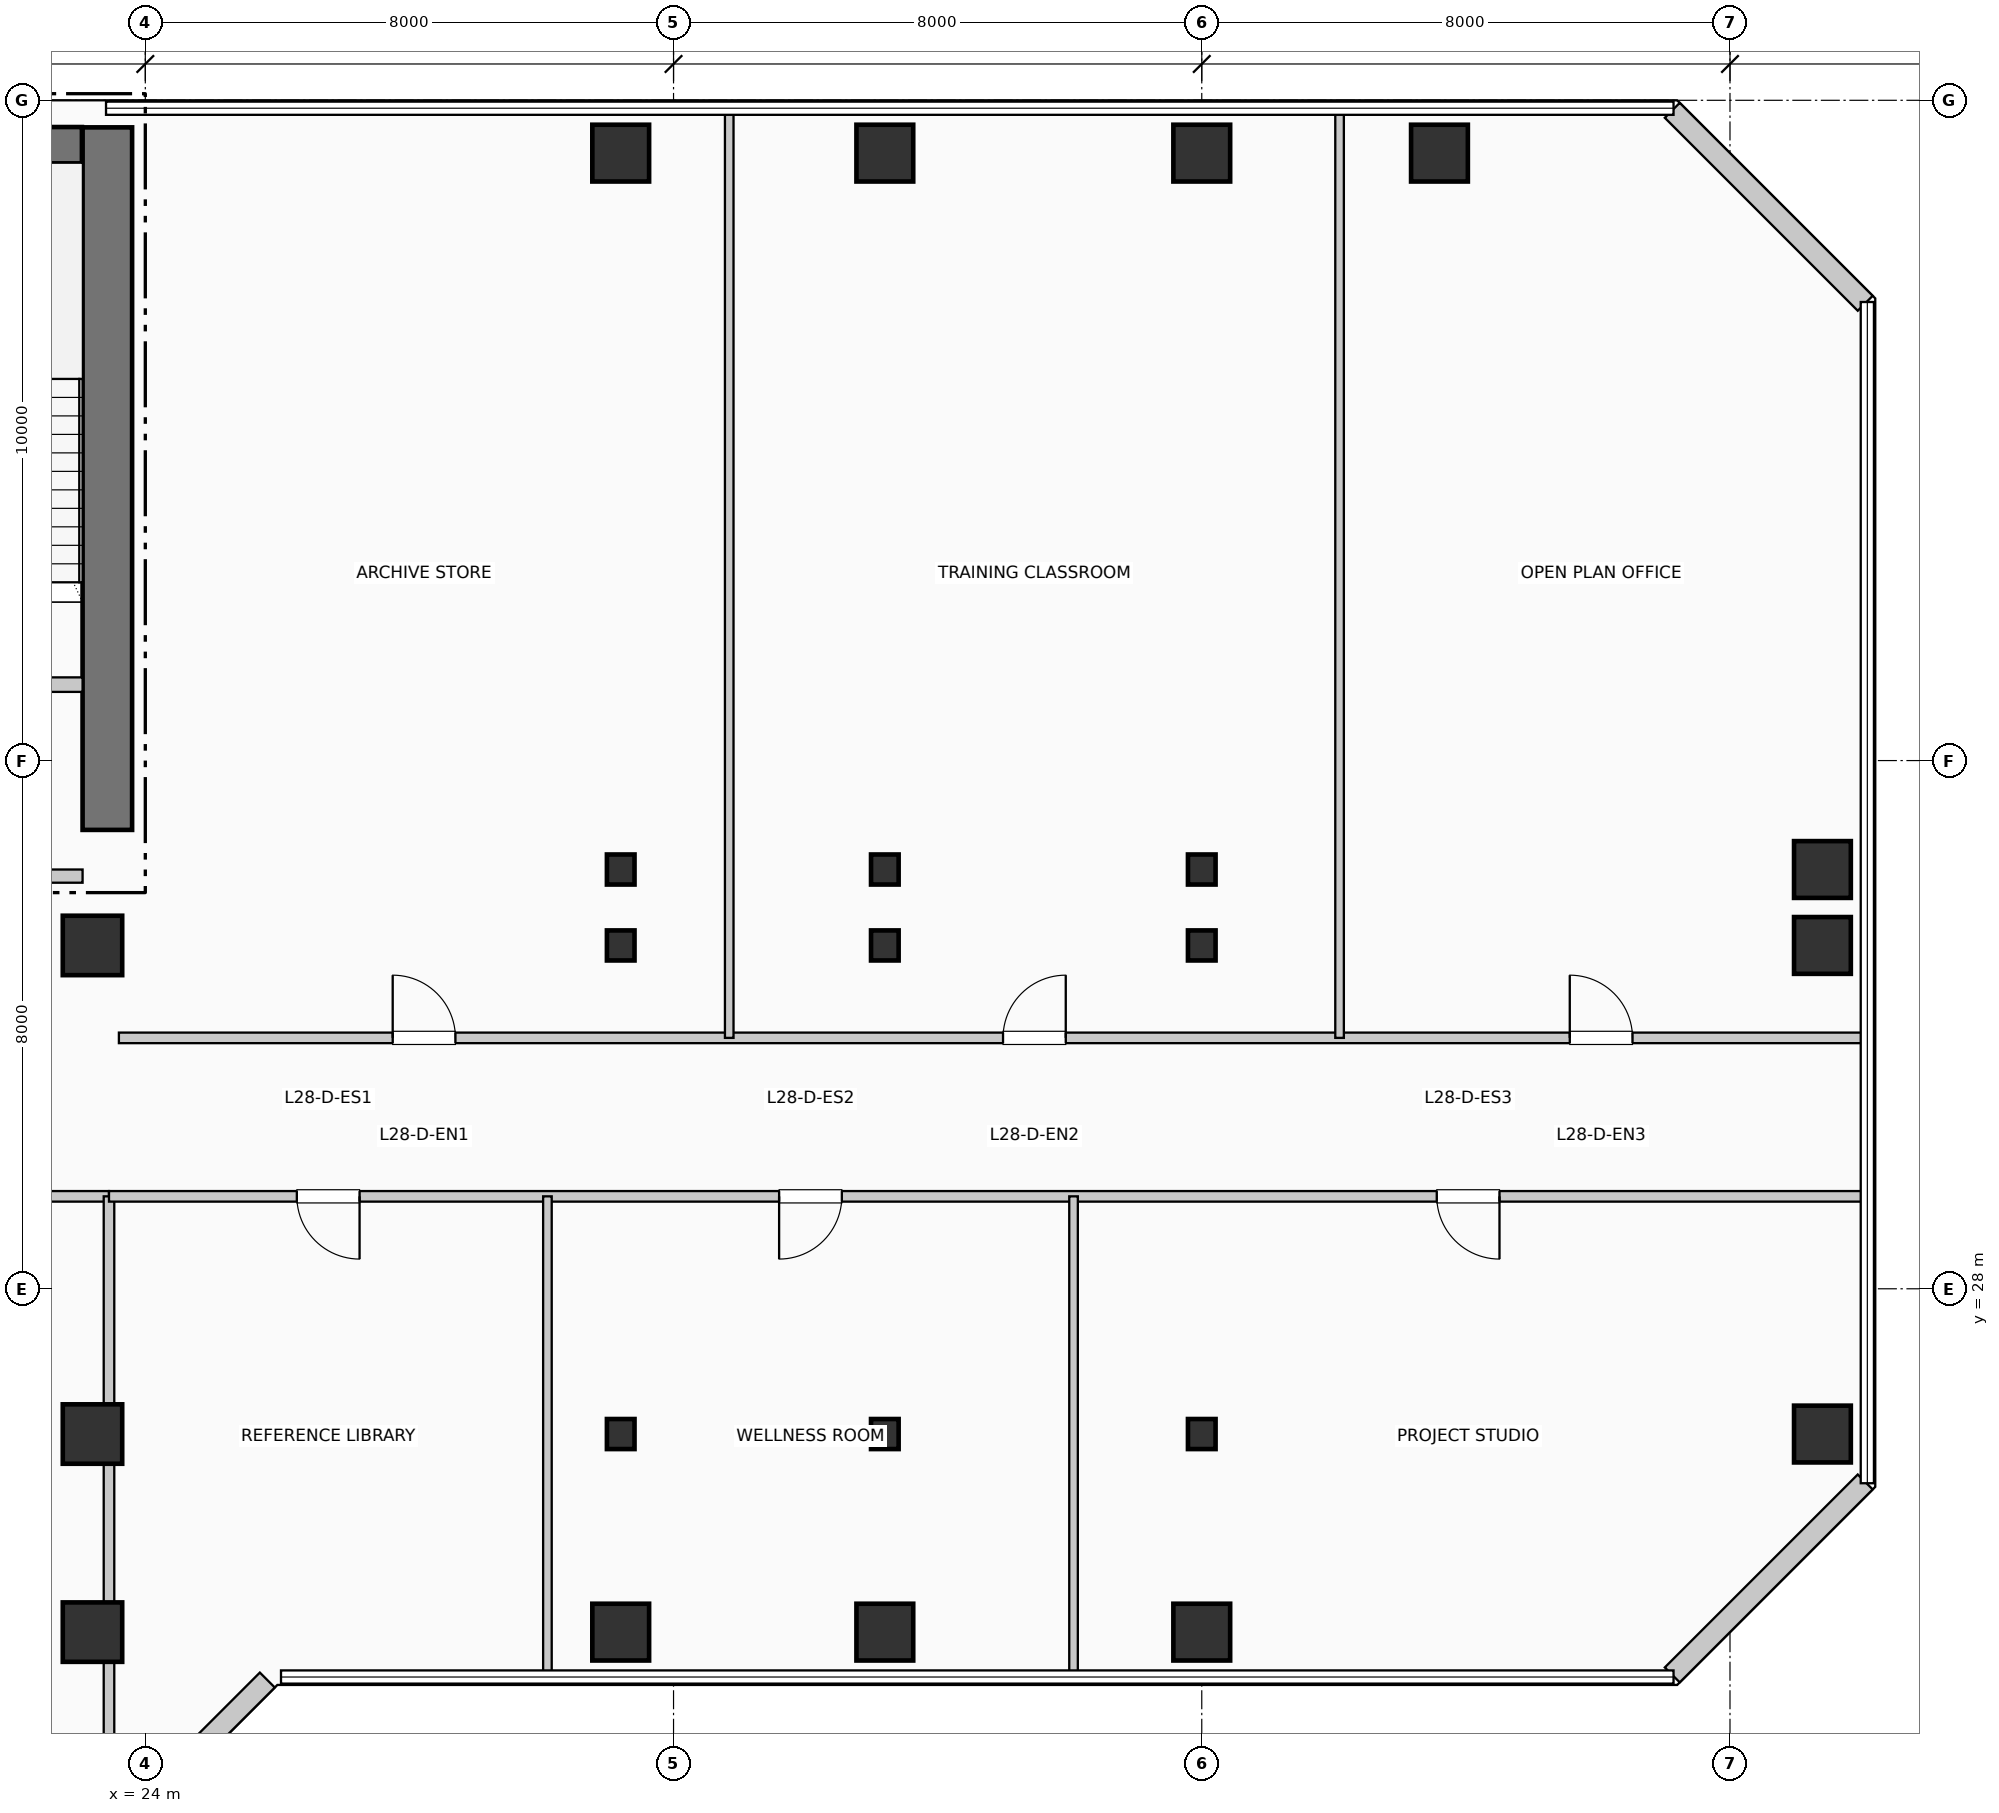
"""IFC4 building model, lengths in metres.
Left out: names, types, materials, properties, quantities, classifications, styles, units other than length and angle.
Written with IfcOpenShell. Run it as: python <this file> out.ifc"""

import sys

from ifc_helpers import new_model, si_unit, direction, frame, frame_2d, origin, origin_2d, place, context, subcontext, project, spatial, rectangle, i_section, extrude, element, fill, save


model = new_model("IFC4")
c1 = context("Model", 3, precision=1e-05, world=origin(), true_north=direction((0.0, 1.0)))
c2 = subcontext(c1, "Body", "Model", "MODEL_VIEW")
j1 = project(units=[si_unit("LENGTHUNIT", "METRE"), si_unit("PLANEANGLEUNIT", "RADIAN")], contexts=[c1])
p1 = place(None, origin())
s1 = spatial("IfcSite", under=j1, at=p1, CompositionType="ELEMENT")
p2 = place(p1, origin())
s2 = spatial("IfcBuilding", under=s1, at=p2, CompositionType="ELEMENT")
p3 = place(p2, frame((0.0, 0.0, 118.47)))
s3 = spatial("IfcBuildingStorey", under=s2, at=p3, CompositionType="ELEMENT", Elevation=118.47)
p4 = place(p3, frame((23.425, 34.95, 0.0), z_axis=(0.0, 0.0, 1.0), x_axis=(0.0, 1.0, 0.0)))
e1 = element("IfcWall", 1, at=p4, inside=s3, PredefinedType="SHEAR", context=c2, shape_type="SweptSolid", body=[
    extrude(rectangle(XDim=10.64, YDim=0.75, at=frame_2d((5.32, 0.0))), origin(), (0.0, 0.0, 1.0), 3.96),
])
p5 = place(p3, frame((19.35, 45.32, 0.0), z_axis=(0.0, 0.0, 1.0), x_axis=(1.0, 0.0, 0.0)))
e2 = element("IfcWall", 2, at=p5, inside=s3, PredefinedType="SHEAR", context=c2, shape_type="SweptSolid", body=[
    extrude(rectangle(XDim=3.69, YDim=0.55, at=frame_2d((1.845, 0.0))), origin(), (0.0, 0.0, 1.0), 3.96),
])
p6 = place(p5, frame((1.15, 0.0, 1.05)))
e3 = element("IfcOpeningElement", 3, at=p6, cuts=e2, PredefinedType="OPENING", context=c2, shape_type="SweptSolid", body=[
    extrude(rectangle(XDim=1.4, YDim=1.8, at=frame_2d((0.7, 0.9))), frame((0.0, 0.285, 0.0), z_axis=(0.0, -1.0, 0.0), x_axis=(1.0, 0.0, 0.0)), (0.0, 0.0, 1.0), 0.57),
])
for number, where, z_axis, x_axis in (
    (4, (23.2, 22.8, 0.0), (0.0, 0.0, 1.0), (1.0, 0.0, 0.0)),
    (5, (23.2, 25.8, 0.0), (0.0, 0.0, 1.0), (1.0, 0.0, 0.0)),
    (6, (23.2, 33.2, 0.0), (0.0, 0.0, 1.0), (1.0, 0.0, 0.0)),
):
    element("IfcColumn", number, at=place(p3, frame(where, z_axis=z_axis, x_axis=x_axis)), inside=s3, PredefinedType="COLUMN", context=c2, shape_type="SweptSolid", body=[
        extrude(rectangle(XDim=0.9, YDim=0.9, at=origin_2d()), origin(), (0.0, 0.0, 1.0), 3.96),
    ])
p7 = place(p3, frame((31.2, 22.8, 0.0), z_axis=(0.0, 0.0, 1.0), x_axis=(1.0, 0.0, 0.0)))
e7 = element("IfcColumn", 7, at=p7, inside=s3, PredefinedType="COLUMN", context=c2, shape_type="SweptSolid", body=[
    extrude(rectangle(XDim=0.86, YDim=0.86, at=origin_2d()), origin(), (0.0, 0.0, 1.0), 3.96),
])
for number, where, z_axis, x_axis in (
    (8, (31.2, 25.8, 0.0), (0.0, 0.0, 1.0), (1.0, 0.0, 0.0)),
    (9, (31.2, 33.2, 0.0), (0.0, 0.0, 1.0), (1.0, 0.0, 0.0)),
    (10, (31.2, 34.35, 0.0), (0.0, 0.0, 1.0), (1.0, 0.0, 0.0)),
):
    element("IfcColumn", number, at=place(p3, frame(where, z_axis=z_axis, x_axis=x_axis)), inside=s3, PredefinedType="COLUMN", context=c2, shape_type="SweptSolid", body=[
        extrude(i_section(OverallWidth=0.418, OverallDepth=0.455, WebThickness=0.032, FlangeThickness=0.051, at=origin_2d()), origin(), (0.0, 0.0, 1.0), 3.96),
    ])
for number, where, z_axis, x_axis in (
    (11, (31.2, 45.2, 0.0), (0.0, 0.0, 1.0), (1.0, 0.0, 0.0)),
    (12, (35.2, 22.8, 0.0), (0.0, 0.0, 1.0), (1.0, 0.0, 0.0)),
):
    element("IfcColumn", number, at=place(p3, frame(where, z_axis=z_axis, x_axis=x_axis)), inside=s3, PredefinedType="COLUMN", context=c2, shape_type="SweptSolid", body=[
        extrude(rectangle(XDim=0.86, YDim=0.86, at=origin_2d()), origin(), (0.0, 0.0, 1.0), 3.96),
    ])
for number, where, z_axis, x_axis in (
    (13, (35.2, 25.8, 0.0), (0.0, 0.0, 1.0), (1.0, 0.0, 0.0)),
    (14, (35.2, 33.2, 0.0), (0.0, 0.0, 1.0), (1.0, 0.0, 0.0)),
    (15, (35.2, 34.35, 0.0), (0.0, 0.0, 1.0), (1.0, 0.0, 0.0)),
):
    element("IfcColumn", number, at=place(p3, frame(where, z_axis=z_axis, x_axis=x_axis)), inside=s3, PredefinedType="COLUMN", context=c2, shape_type="SweptSolid", body=[
        extrude(i_section(OverallWidth=0.418, OverallDepth=0.455, WebThickness=0.032, FlangeThickness=0.051, at=origin_2d()), origin(), (0.0, 0.0, 1.0), 3.96),
    ])
for number, where, z_axis, x_axis in (
    (16, (35.2, 45.2, 0.0), (0.0, 0.0, 1.0), (1.0, 0.0, 0.0)),
    (17, (40.0, 22.8, 0.0), (0.0, 0.0, 1.0), (1.0, 0.0, 0.0)),
):
    element("IfcColumn", number, at=place(p3, frame(where, z_axis=z_axis, x_axis=x_axis)), inside=s3, PredefinedType="COLUMN", context=c2, shape_type="SweptSolid", body=[
        extrude(rectangle(XDim=0.86, YDim=0.86, at=origin_2d()), origin(), (0.0, 0.0, 1.0), 3.96),
    ])
for number, where, z_axis, x_axis in (
    (18, (40.0, 25.8, 0.0), (0.0, 0.0, 1.0), (1.0, 0.0, 0.0)),
    (19, (40.0, 33.2, 0.0), (0.0, 0.0, 1.0), (1.0, 0.0, 0.0)),
    (20, (40.0, 34.35, 0.0), (0.0, 0.0, 1.0), (1.0, 0.0, 0.0)),
):
    element("IfcColumn", number, at=place(p3, frame(where, z_axis=z_axis, x_axis=x_axis)), inside=s3, PredefinedType="COLUMN", context=c2, shape_type="SweptSolid", body=[
        extrude(i_section(OverallWidth=0.418, OverallDepth=0.455, WebThickness=0.032, FlangeThickness=0.051, at=origin_2d()), origin(), (0.0, 0.0, 1.0), 3.96),
    ])
for number, where, z_axis, x_axis in (
    (21, (40.0, 45.2, 0.0), (0.0, 0.0, 1.0), (1.0, 0.0, 0.0)),
    (22, (43.6, 45.2, 0.0), (0.0, 0.0, 1.0), (1.0, 0.0, 0.0)),
    (23, (49.4, 25.8, 0.0), (0.0, 0.0, 1.0), (1.0, 0.0, 0.0)),
    (24, (49.4, 33.2, 0.0), (0.0, 0.0, 1.0), (1.0, 0.0, 0.0)),
    (25, (49.4, 34.35, 0.0), (0.0, 0.0, 1.0), (1.0, 0.0, 0.0)),
):
    element("IfcColumn", number, at=place(p3, frame(where, z_axis=z_axis, x_axis=x_axis)), inside=s3, PredefinedType="COLUMN", context=c2, shape_type="SweptSolid", body=[
        extrude(rectangle(XDim=0.86, YDim=0.86, at=origin_2d()), origin(), (0.0, 0.0, 1.0), 3.96),
    ])
p8 = place(p3, frame((23.926, 20.152, 0.0), z_axis=(0.0, 0.0, 1.0), x_axis=(0.707106781187, 0.707106781187, 0.0)))
e26 = element("IfcWall", 26, at=p8, inside=s3, PredefinedType="SOLIDWALL", context=c2, shape_type="SweptSolid", body=[
    extrude(rectangle(XDim=2.718, YDim=0.32, at=frame_2d((1.359, 0.0))), origin(), (0.0, 0.0, 1.0), 3.71),
])
for number, where, z_axis, x_axis in (
    (27, (47.126, 22.152, 0.0), (0.0, 0.0, 1.0), (0.707, 0.707, 0.0)),
    (28, (50.048, 42.926, 0.0), (0.0, 0.0, 1.0), (-0.707, 0.707, 0.0)),
):
    element("IfcWall", number, at=place(p3, frame(where, z_axis=z_axis, x_axis=x_axis)), inside=s3, PredefinedType="SOLIDWALL", context=c2, shape_type="SweptSolid", body=[
        extrude(rectangle(XDim=4.133, YDim=0.32, at=frame_2d((2.066, 0.0))), origin(), (0.0, 0.0, 1.0), 3.71),
    ])
p9 = place(p3, frame((19.9, 37.15, 0.0), z_axis=(0.0, 0.0, 1.0), x_axis=(1.0, 0.0, 0.0)))
e29 = element("IfcWall", 29, at=p9, inside=s3, PredefinedType="PARTITIONING", context=c2, shape_type="SweptSolid", body=[
    extrude(rectangle(XDim=3.15, YDim=0.22, at=frame_2d((1.575, 0.0))), origin(), (0.0, 0.0, 1.0), 3.71),
])
p10 = place(p9, frame((2.05, 0.0, 0.0), z_axis=(0.0, 0.0, 1.0), x_axis=(-1.0, 0.0, 0.0)))
e30 = element("IfcOpeningElement", 30, at=p10, cuts=e29, PredefinedType="OPENING", context=c2, shape_type="SweptSolid", body=[
    extrude(rectangle(XDim=1.05, YDim=2.15, at=frame_2d((0.525, 1.075))), frame((0.0, 0.12, 0.0), z_axis=(0.0, -1.0, 0.0), x_axis=(1.0, 0.0, 0.0)), (0.0, 0.0, 1.0), 0.24),
])
p11 = place(p3, frame((19.8, 34.25, 0.0), z_axis=(0.0, 0.0, 1.0), x_axis=(1.0, 0.0, 0.0)))
e31 = element("IfcWall", 31, at=p11, inside=s3, PredefinedType="PARTITIONING", context=c2, shape_type="SweptSolid", body=[
    extrude(rectangle(XDim=3.25, YDim=0.2, at=frame_2d((1.625, 0.0))), origin(), (0.0, 0.0, 1.0), 3.71),
])
p12 = place(p11, frame((2.15, 0.0, 0.0), z_axis=(0.0, 0.0, 1.0), x_axis=(-1.0, 0.0, 0.0)))
e32 = element("IfcOpeningElement", 32, at=p12, cuts=e31, PredefinedType="OPENING", context=c2, shape_type="SweptSolid", body=[
    extrude(rectangle(XDim=1.1, YDim=2.15, at=frame_2d((0.55, 1.075))), frame((0.0, 0.11, 0.0), z_axis=(0.0, -1.0, 0.0), x_axis=(1.0, 0.0, 0.0)), (0.0, 0.0, 1.0), 0.22),
])
p13 = place(p3, frame((19.24, 29.4, 0.0), z_axis=(0.0, 0.0, 1.0), x_axis=(1.0, 0.0, 0.0)))
e33 = element("IfcWall", 33, at=p13, inside=s3, PredefinedType="PARTITIONING", context=c2, shape_type="SweptSolid", body=[
    extrude(rectangle(XDim=4.21, YDim=0.16, at=frame_2d((2.105, 0.0))), origin(), (0.0, 0.0, 1.0), 3.71),
])
p14 = place(p3, frame((23.45, 1.04, 0.0), z_axis=(0.0, 0.0, 1.0), x_axis=(0.0, 1.0, 0.0)))
e34 = element("IfcWall", 34, at=p14, inside=s3, PredefinedType="PARTITIONING", context=c2, shape_type="SweptSolid", body=[
    extrude(rectangle(XDim=28.36, YDim=0.16, at=frame_2d((14.18, 0.0))), origin(), (0.0, 0.0, 1.0), 3.045),
])
p15 = place(p3, frame((23.45, 29.4, 0.0), z_axis=(0.0, 0.0, 1.0), x_axis=(1.0, 0.0, 0.0)))
e35 = element("IfcWall", 35, at=p15, inside=s3, PredefinedType="PARTITIONING", context=c2, shape_type="SweptSolid", body=[
    extrude(rectangle(XDim=26.56, YDim=0.16, at=frame_2d((13.28, 0.0))), origin(), (0.0, 0.0, 1.0), 3.365),
])
p16 = place(p15, frame((3.795, 0.0, 0.0), z_axis=(0.0, 0.0, 1.0), x_axis=(-1.0, 0.0, 0.0)))
e36 = element("IfcOpeningElement", 36, at=p16, cuts=e35, PredefinedType="OPENING", context=c2, shape_type="SweptSolid", body=[
    extrude(rectangle(XDim=0.95, YDim=2.15, at=frame_2d((0.475, 1.075))), frame((0.0, 0.09, 0.0), z_axis=(0.0, -1.0, 0.0), x_axis=(1.0, 0.0, 0.0)), (0.0, 0.0, 1.0), 0.18),
])
p17 = place(p15, frame((11.099, 0.0, 0.0), z_axis=(0.0, 0.0, 1.0), x_axis=(-1.0, 0.0, 0.0)))
e37 = element("IfcOpeningElement", 37, at=p17, cuts=e35, PredefinedType="OPENING", context=c2, shape_type="SweptSolid", body=[
    extrude(rectangle(XDim=0.95, YDim=2.15, at=frame_2d((0.475, 1.075))), frame((0.0, 0.09, 0.0), z_axis=(0.0, -1.0, 0.0), x_axis=(1.0, 0.0, 0.0)), (0.0, 0.0, 1.0), 0.18),
])
p18 = place(p15, frame((21.059, 0.0, 0.0), z_axis=(0.0, 0.0, 1.0), x_axis=(-1.0, 0.0, 0.0)))
e38 = element("IfcOpeningElement", 38, at=p18, cuts=e35, PredefinedType="OPENING", context=c2, shape_type="SweptSolid", body=[
    extrude(rectangle(XDim=0.95, YDim=2.15, at=frame_2d((0.475, 1.075))), frame((0.0, 0.09, 0.0), z_axis=(0.0, -1.0, 0.0), x_axis=(1.0, 0.0, 0.0)), (0.0, 0.0, 1.0), 0.18),
])
p19 = place(p3, frame((23.6, 31.8, 0.0), z_axis=(0.0, 0.0, 1.0), x_axis=(1.0, 0.0, 0.0)))
e39 = element("IfcWall", 39, at=p19, inside=s3, PredefinedType="PARTITIONING", context=c2, shape_type="SweptSolid", body=[
    extrude(rectangle(XDim=26.41, YDim=0.16, at=frame_2d((13.205, 0.0))), origin(), (0.0, 0.0, 1.0), 3.71),
])
p20 = place(p19, frame((4.147, 0.0, 0.0)))
e40 = element("IfcOpeningElement", 40, at=p20, cuts=e39, PredefinedType="OPENING", context=c2, shape_type="SweptSolid", body=[
    extrude(rectangle(XDim=0.95, YDim=2.15, at=frame_2d((0.475, 1.075))), frame((0.0, 0.09, 0.0), z_axis=(0.0, -1.0, 0.0), x_axis=(1.0, 0.0, 0.0)), (0.0, 0.0, 1.0), 0.18),
])
p21 = place(p19, frame((13.39, 0.0, 0.0)))
e41 = element("IfcOpeningElement", 41, at=p21, cuts=e39, PredefinedType="OPENING", context=c2, shape_type="SweptSolid", body=[
    extrude(rectangle(XDim=0.95, YDim=2.15, at=frame_2d((0.475, 1.075))), frame((0.0, 0.09, 0.0), z_axis=(0.0, -1.0, 0.0), x_axis=(1.0, 0.0, 0.0)), (0.0, 0.0, 1.0), 0.18),
])
p22 = place(p19, frame((21.973, 0.0, 0.0)))
e42 = element("IfcOpeningElement", 42, at=p22, cuts=e39, PredefinedType="OPENING", context=c2, shape_type="SweptSolid", body=[
    extrude(rectangle(XDim=0.95, YDim=2.15, at=frame_2d((0.475, 1.075))), frame((0.0, 0.09, 0.0), z_axis=(0.0, -1.0, 0.0), x_axis=(1.0, 0.0, 0.0)), (0.0, 0.0, 1.0), 0.18),
])
for number, where, z_axis, x_axis in (
    (43, (30.09, 22.19, 0.0), (0.0, 0.0, 1.0), (0.0, 1.0, 0.0)),
    (44, (38.058, 22.19, 0.0), (0.0, 0.0, 1.0), (0.0, 1.0, 0.0)),
):
    element("IfcWall", number, at=place(p3, frame(where, z_axis=z_axis, x_axis=x_axis)), inside=s3, PredefinedType="PARTITIONING", context=c2, shape_type="SweptSolid", body=[
        extrude(rectangle(XDim=7.21, YDim=0.13, at=frame_2d((3.605, 0.0))), origin(), (0.0, 0.0, 1.0), 3.71),
    ])
for number, where, z_axis, x_axis in (
    (45, (32.844, 31.8, 0.0), (0.0, 0.0, 1.0), (0.0, 1.0, 0.0)),
    (46, (42.087, 31.8, 0.0), (0.0, 0.0, 1.0), (0.0, 1.0, 0.0)),
):
    element("IfcWall", number, at=place(p3, frame(where, z_axis=z_axis, x_axis=x_axis)), inside=s3, PredefinedType="PARTITIONING", context=c2, shape_type="SweptSolid", body=[
        extrude(rectangle(XDim=14.01, YDim=0.13, at=frame_2d((7.005, 0.0))), origin(), (0.0, 0.0, 1.0), 3.71),
    ])
p23 = place(p16, origin())
e47 = element("IfcDoor", 47, at=p23, inside=s3, OperationType="SINGLE_SWING_RIGHT", PredefinedType="DOOR", context=c2, shape_type="SweptSolid", body=[
    extrude(rectangle(XDim=0.95, YDim=2.15, at=frame_2d((0.475, 1.075))), frame((0.0, 0.025, 0.0), z_axis=(0.0, -1.0, 0.0), x_axis=(1.0, 0.0, 0.0)), (0.0, 0.0, 1.0), 0.05),
])
fill(e36, e47)
p24 = place(p17, origin())
e48 = element("IfcDoor", 48, at=p24, inside=s3, OperationType="SINGLE_SWING_LEFT", PredefinedType="DOOR", context=c2, shape_type="SweptSolid", body=[
    extrude(rectangle(XDim=0.95, YDim=2.15, at=frame_2d((0.475, 1.075))), frame((0.0, 0.025, 0.0), z_axis=(0.0, -1.0, 0.0), x_axis=(1.0, 0.0, 0.0)), (0.0, 0.0, 1.0), 0.05),
])
fill(e37, e48)
p25 = place(p18, origin())
e49 = element("IfcDoor", 49, at=p25, inside=s3, OperationType="SINGLE_SWING_RIGHT", PredefinedType="DOOR", context=c2, shape_type="SweptSolid", body=[
    extrude(rectangle(XDim=0.95, YDim=2.15, at=frame_2d((0.475, 1.075))), frame((0.0, 0.025, 0.0), z_axis=(0.0, -1.0, 0.0), x_axis=(1.0, 0.0, 0.0)), (0.0, 0.0, 1.0), 0.05),
])
fill(e38, e49)
p26 = place(p20, origin())
e50 = element("IfcDoor", 50, at=p26, inside=s3, OperationType="SINGLE_SWING_LEFT", PredefinedType="DOOR", context=c2, shape_type="SweptSolid", body=[
    extrude(rectangle(XDim=0.95, YDim=2.15, at=frame_2d((0.475, 1.075))), frame((0.0, 0.025, 0.0), z_axis=(0.0, -1.0, 0.0), x_axis=(1.0, 0.0, 0.0)), (0.0, 0.0, 1.0), 0.05),
])
fill(e40, e50)
p27 = place(p21, origin())
e51 = element("IfcDoor", 51, at=p27, inside=s3, OperationType="SINGLE_SWING_RIGHT", PredefinedType="DOOR", context=c2, shape_type="SweptSolid", body=[
    extrude(rectangle(XDim=0.95, YDim=2.15, at=frame_2d((0.475, 1.075))), frame((0.0, 0.025, 0.0), z_axis=(0.0, -1.0, 0.0), x_axis=(1.0, 0.0, 0.0)), (0.0, 0.0, 1.0), 0.05),
])
fill(e41, e51)
p28 = place(p22, origin())
e52 = element("IfcDoor", 52, at=p28, inside=s3, OperationType="SINGLE_SWING_LEFT", PredefinedType="DOOR", context=c2, shape_type="SweptSolid", body=[
    extrude(rectangle(XDim=0.95, YDim=2.15, at=frame_2d((0.475, 1.075))), frame((0.0, 0.025, 0.0), z_axis=(0.0, -1.0, 0.0), x_axis=(1.0, 0.0, 0.0)), (0.0, 0.0, 1.0), 0.05),
])
fill(e42, e52)
save(model, sys.argv[1])
